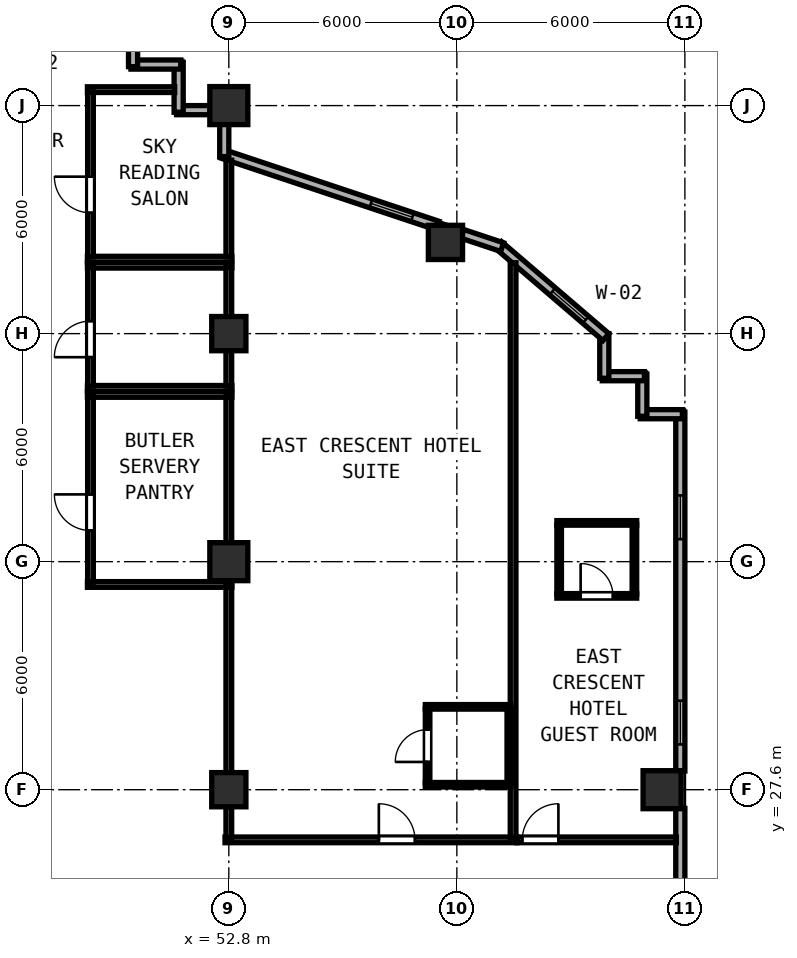
"""IFC4 building model, lengths in metres.
Left out: names, types, materials, properties, quantities, classifications, styles, units other than length and angle.
Written with IfcOpenShell. Run it as: python <this file> out.ifc"""

import sys

from ifc_helpers import new_model, si_unit, direction, frame, frame_2d, origin, origin_2d, place, context, subcontext, project, spatial, rectangle, hollow_rectangle, extrude, element, fill, save


model = new_model("IFC4")
c1 = context("Model", 3, precision=1e-05, world=origin(), true_north=direction((0.0, 1.0)))
c2 = subcontext(c1, "Body", "Model", "MODEL_VIEW")
j1 = project(units=[si_unit("LENGTHUNIT", "METRE"), si_unit("PLANEANGLEUNIT", "RADIAN")], contexts=[c1])
p1 = place(None, origin())
s1 = spatial("IfcSite", under=j1, at=p1, CompositionType="ELEMENT")
p2 = place(p1, origin())
s2 = spatial("IfcBuilding", under=s1, at=p2, CompositionType="ELEMENT")
p3 = place(p2, frame((0.0, 0.0, 113.6)))
s3 = spatial("IfcBuildingStorey", under=s2, at=p3, CompositionType="ELEMENT", Elevation=113.6)
for number, where, z_axis, x_axis in (
    (1, (52.8, 33.6, 0.0), (0.0, 0.0, 1.0), (1.0, 0.0, 0.0)),
    (2, (52.8, 45.6, 0.0), (0.0, 0.0, 1.0), (1.0, 0.0, 0.0)),
    (3, (64.2, 27.6, 0.0), (0.0, 0.0, 1.0), (1.0, 0.0, 0.0)),
):
    element("IfcColumn", number, at=place(p3, frame(where, z_axis=z_axis, x_axis=x_axis)), inside=s3, PredefinedType="COLUMN", context=c2, shape_type="SweptSolid", body=[
        extrude(hollow_rectangle(XDim=1.0, YDim=1.0, WallThickness=0.038, at=origin_2d()), origin(), (0.0, 0.0, 1.0), 3.8),
    ])
for number, where, z_axis, x_axis in (
    (4, (52.8, 27.6, 0.0), (0.0, 0.0, 1.0), (1.0, 0.0, 0.0)),
    (5, (52.8, 39.6, 0.0), (0.0, 0.0, 1.0), (1.0, 0.0, 0.0)),
    (6, (58.5, 42.0, 0.0), (0.0, 0.0, 1.0), (1.0, 0.0, 0.0)),
):
    element("IfcColumn", number, at=place(p3, frame(where, z_axis=z_axis, x_axis=x_axis)), inside=s3, PredefinedType="COLUMN", context=c2, shape_type="SweptSolid", body=[
        extrude(hollow_rectangle(XDim=0.9, YDim=0.9, WallThickness=0.034, at=origin_2d()), origin(), (0.0, 0.0, 1.0), 3.8),
    ])
p4 = place(p3, frame((64.68, 17.292, 0.0), z_axis=(0.0, 0.0, 1.0), x_axis=(0.0, 1.0, 0.0)))
e7 = element("IfcWall", 7, at=p4, inside=s3, PredefinedType="SOLIDWALL", context=c2, shape_type="SweptSolid", body=[
    extrude(rectangle(XDim=9.816, YDim=0.24, at=frame_2d((4.908, 0.0))), origin(), (0.0, 0.0, 1.0), 3.6),
])
p5 = place(p4, frame((0.7, 0.0, 0.85)))
e8 = element("IfcOpeningElement", 8, at=p5, cuts=e7, PredefinedType="OPENING", context=c2, shape_type="SweptSolid", body=[
    extrude(rectangle(XDim=1.15, YDim=1.8, at=frame_2d((0.575, 0.9))), frame((0.0, 0.13, 0.0), z_axis=(0.0, -1.0, 0.0), x_axis=(1.0, 0.0, 0.0)), (0.0, 0.0, 1.0), 0.26),
])
p6 = place(p4, frame((5.593, 0.0, 0.85)))
e9 = element("IfcOpeningElement", 9, at=p6, cuts=e7, PredefinedType="OPENING", context=c2, shape_type="SweptSolid", body=[
    extrude(rectangle(XDim=1.15, YDim=1.8, at=frame_2d((0.575, 0.9))), frame((0.0, 0.13, 0.0), z_axis=(0.0, -1.0, 0.0), x_axis=(1.0, 0.0, 0.0)), (0.0, 0.0, 1.0), 0.26),
])
p7 = place(p3, frame((64.68, 28.092, 0.0), z_axis=(0.0, 0.0, 1.0), x_axis=(0.0, 1.0, 0.0)))
e10 = element("IfcWall", 10, at=p7, inside=s3, PredefinedType="SOLIDWALL", context=c2, shape_type="SweptSolid", body=[
    extrude(rectangle(XDim=9.443, YDim=0.24, at=frame_2d((4.721, 0.0))), origin(), (0.0, 0.0, 1.0), 3.6),
])
p8 = place(p7, frame((0.7, 0.0, 0.85)))
e11 = element("IfcOpeningElement", 11, at=p8, cuts=e10, PredefinedType="OPENING", context=c2, shape_type="SweptSolid", body=[
    extrude(rectangle(XDim=1.15, YDim=1.8, at=frame_2d((0.575, 0.9))), frame((0.0, 0.13, 0.0), z_axis=(0.0, -1.0, 0.0), x_axis=(1.0, 0.0, 0.0)), (0.0, 0.0, 1.0), 0.26),
])
p9 = place(p7, frame((6.1, 0.0, 0.85)))
e12 = element("IfcOpeningElement", 12, at=p9, cuts=e10, PredefinedType="OPENING", context=c2, shape_type="SweptSolid", body=[
    extrude(rectangle(XDim=1.15, YDim=1.8, at=frame_2d((0.575, 0.9))), frame((0.0, 0.13, 0.0), z_axis=(0.0, -1.0, 0.0), x_axis=(1.0, 0.0, 0.0)), (0.0, 0.0, 1.0), 0.26),
])
p10 = place(p3, frame((64.735, 37.48, 0.0), z_axis=(0.0, 0.0, 1.0), x_axis=(-1.0, 0.0, 0.0)))
e13 = element("IfcWall", 13, at=p10, inside=s3, PredefinedType="SOLIDWALL", context=c2, shape_type="SweptSolid", body=[
    extrude(rectangle(XDim=1.11, YDim=0.24, at=frame_2d((0.555, 0.0))), origin(), (0.0, 0.0, 1.0), 3.6),
])
p11 = place(p3, frame((63.68, 37.425, 0.0), z_axis=(0.0, 0.0, 1.0), x_axis=(0.0, 1.0, 0.0)))
e14 = element("IfcWall", 14, at=p11, inside=s3, PredefinedType="SOLIDWALL", context=c2, shape_type="SweptSolid", body=[
    extrude(rectangle(XDim=1.11, YDim=0.24, at=frame_2d((0.555, 0.0))), origin(), (0.0, 0.0, 1.0), 3.6),
])
p12 = place(p3, frame((63.735, 38.48, 0.0), z_axis=(0.0, 0.0, 1.0), x_axis=(-1.0, 0.0, 0.0)))
e15 = element("IfcWall", 15, at=p12, inside=s3, PredefinedType="SOLIDWALL", context=c2, shape_type="SweptSolid", body=[
    extrude(rectangle(XDim=1.11, YDim=0.24, at=frame_2d((0.555, 0.0))), origin(), (0.0, 0.0, 1.0), 3.6),
])
p13 = place(p3, frame((62.68, 38.425, 0.0), z_axis=(0.0, 0.0, 1.0), x_axis=(0.0, 1.0, 0.0)))
e16 = element("IfcWall", 16, at=p13, inside=s3, PredefinedType="SOLIDWALL", context=c2, shape_type="SweptSolid", body=[
    extrude(rectangle(XDim=1.175, YDim=0.24, at=frame_2d((0.587, 0.0))), origin(), (0.0, 0.0, 1.0), 3.6),
])
p14 = place(p3, frame((62.722, 39.509, 0.0), z_axis=(0.0, 0.0, 1.0), x_axis=(-0.759247334792, 0.650802185469, 0.0)))
e17 = element("IfcWall", 17, at=p14, inside=s3, PredefinedType="SOLIDWALL", context=c2, shape_type="SweptSolid", body=[
    extrude(rectangle(XDim=3.719, YDim=0.24, at=frame_2d((1.86, 0.0))), origin(), (0.0, 0.0, 1.0), 3.6),
])
p15 = place(p14, frame((0.7, 0.0, 0.85)))
e18 = element("IfcOpeningElement", 18, at=p15, cuts=e17, PredefinedType="OPENING", context=c2, shape_type="SweptSolid", body=[
    extrude(rectangle(XDim=1.15, YDim=1.8, at=frame_2d((0.575, 0.9))), frame((0.0, 0.13, 0.0), z_axis=(0.0, -1.0, 0.0), x_axis=(1.0, 0.0, 0.0)), (0.0, 0.0, 1.0), 0.26),
])
p16 = place(p3, frame((59.992, 41.876, 0.0), z_axis=(0.0, 0.0, 1.0), x_axis=(-0.948661238983, 0.316293935527, 0.0)))
e19 = element("IfcWall", 19, at=p16, inside=s3, PredefinedType="SOLIDWALL", context=c2, shape_type="SweptSolid", body=[
    extrude(rectangle(XDim=1.107, YDim=0.24, at=frame_2d((0.553, 0.0))), origin(), (0.0, 0.0, 1.0), 3.6),
])
p17 = place(p3, frame((58.295, 42.442, 0.0), z_axis=(0.0, 0.0, 1.0), x_axis=(-0.948687385027, 0.316215504823, 0.0)))
e20 = element("IfcWall", 20, at=p17, inside=s3, PredefinedType="SOLIDWALL", context=c2, shape_type="SweptSolid", body=[
    extrude(rectangle(XDim=5.973, YDim=0.24, at=frame_2d((2.987, 0.0))), origin(), (0.0, 0.0, 1.0), 3.145),
])
p18 = place(p17, frame((0.7, 0.0, 0.85)))
e21 = element("IfcOpeningElement", 21, at=p18, cuts=e20, PredefinedType="OPENING", context=c2, shape_type="SweptSolid", body=[
    extrude(rectangle(XDim=1.15, YDim=1.8, at=frame_2d((0.575, 0.9))), frame((0.0, 0.13, 0.0), z_axis=(0.0, -1.0, 0.0), x_axis=(1.0, 0.0, 0.0)), (0.0, 0.0, 1.0), 0.26),
])
p19 = place(p3, frame((52.68, 44.259, 0.0), z_axis=(0.0, 0.0, 1.0), x_axis=(0.0, 1.0, 0.0)))
e22 = element("IfcWall", 22, at=p19, inside=s3, PredefinedType="SOLIDWALL", context=c2, shape_type="SweptSolid", body=[
    extrude(rectangle(XDim=0.849, YDim=0.24, at=frame_2d((0.425, 0.0))), origin(), (0.0, 0.0, 1.0), 3.145),
])
p20 = place(p3, frame((52.308, 45.48, 0.0), z_axis=(0.0, 0.0, 1.0), x_axis=(-1.0, 0.0, 0.0)))
e23 = element("IfcWall", 23, at=p20, inside=s3, PredefinedType="SOLIDWALL", context=c2, shape_type="SweptSolid", body=[
    extrude(rectangle(XDim=0.883, YDim=0.24, at=frame_2d((0.441, 0.0))), origin(), (0.0, 0.0, 1.0), 3.6),
])
p21 = place(p3, frame((51.48, 45.425, 0.0), z_axis=(0.0, 0.0, 1.0), x_axis=(0.0, 1.0, 0.0)))
e24 = element("IfcWall", 24, at=p21, inside=s3, PredefinedType="SOLIDWALL", context=c2, shape_type="SweptSolid", body=[
    extrude(rectangle(XDim=1.31, YDim=0.24, at=frame_2d((0.655, 0.0))), origin(), (0.0, 0.0, 1.0), 3.6),
])
p22 = place(p3, frame((51.535, 46.68, 0.0), z_axis=(0.0, 0.0, 1.0), x_axis=(-1.0, 0.0, 0.0)))
e25 = element("IfcWall", 25, at=p22, inside=s3, PredefinedType="SOLIDWALL", context=c2, shape_type="SweptSolid", body=[
    extrude(rectangle(XDim=1.31, YDim=0.24, at=frame_2d((0.655, 0.0))), origin(), (0.0, 0.0, 1.0), 3.6),
])
p23 = place(p3, frame((50.28, 46.625, 0.0), z_axis=(0.0, 0.0, 1.0), x_axis=(0.0, 1.0, 0.0)))
e26 = element("IfcWall", 26, at=p23, inside=s3, PredefinedType="SOLIDWALL", context=c2, shape_type="SweptSolid", body=[
    extrude(rectangle(XDim=1.54, YDim=0.24, at=frame_2d((0.77, 0.0))), origin(), (0.0, 0.0, 1.0), 3.6),
])
for number, where, z_axis, x_axis in (
    (27, (49.08, 38.0, 0.0), (0.0, 0.0, 1.0), (1.0, 0.0, 0.0)),
    (28, (49.08, 33.0, 0.0), (0.0, 0.0, 1.0), (1.0, 0.0, 0.0)),
):
    element("IfcWall", number, at=place(p3, frame(where, z_axis=z_axis, x_axis=x_axis)), inside=s3, PredefinedType="PARTITIONING", context=c2, shape_type="SweptSolid", body=[
        extrude(rectangle(XDim=3.8, YDim=0.15, at=frame_2d((1.9, 0.0))), origin(), (0.0, 0.0, 1.0), 3.6),
    ])
p24 = place(p3, frame((49.16, 33.06, 0.0), z_axis=(0.0, 0.0, 1.0), x_axis=(0.0, 1.0, 0.0)))
e29 = element("IfcWall", 29, at=p24, inside=s3, PredefinedType="PARTITIONING", context=c2, shape_type="SweptSolid", body=[
    extrude(rectangle(XDim=4.88, YDim=0.15, at=frame_2d((2.44, 0.0))), origin(), (0.0, 0.0, 1.0), 3.6),
])
p25 = place(p24, frame((1.36, 0.0, 0.0)))
e30 = element("IfcOpeningElement", 30, at=p25, cuts=e29, PredefinedType="OPENING", context=c2, shape_type="SweptSolid", body=[
    extrude(rectangle(XDim=0.95, YDim=2.12, at=frame_2d((0.475, 1.06))), frame((0.0, 0.085, 0.0), z_axis=(0.0, -1.0, 0.0), x_axis=(1.0, 0.0, 0.0)), (0.0, 0.0, 1.0), 0.17),
])
p26 = place(p3, frame((52.8, 33.06, 0.0), z_axis=(0.0, 0.0, 1.0), x_axis=(0.0, 1.0, 0.0)))
e31 = element("IfcWall", 31, at=p26, inside=s3, PredefinedType="PARTITIONING", context=c2, shape_type="SweptSolid", body=[
    extrude(rectangle(XDim=4.88, YDim=0.15, at=frame_2d((2.44, 0.0))), origin(), (0.0, 0.0, 1.0), 3.145),
])
for number, where, z_axis, x_axis in (
    (32, (49.08, 41.4, 0.0), (0.0, 0.0, 1.0), (1.0, 0.0, 0.0)),
    (33, (49.08, 38.16, 0.0), (0.0, 0.0, 1.0), (1.0, 0.0, 0.0)),
):
    element("IfcWall", number, at=place(p3, frame(where, z_axis=z_axis, x_axis=x_axis)), inside=s3, PredefinedType="PARTITIONING", context=c2, shape_type="SweptSolid", body=[
        extrude(rectangle(XDim=3.8, YDim=0.15, at=frame_2d((1.9, 0.0))), origin(), (0.0, 0.0, 1.0), 3.6),
    ])
p27 = place(p3, frame((49.16, 38.22, 0.0), z_axis=(0.0, 0.0, 1.0), x_axis=(0.0, 1.0, 0.0)))
e34 = element("IfcWall", 34, at=p27, inside=s3, PredefinedType="PARTITIONING", context=c2, shape_type="SweptSolid", body=[
    extrude(rectangle(XDim=3.12, YDim=0.15, at=frame_2d((1.56, 0.0))), origin(), (0.0, 0.0, 1.0), 3.6),
])
p28 = place(p27, frame((0.76, 0.0, 0.0)))
e35 = element("IfcOpeningElement", 35, at=p28, cuts=e34, PredefinedType="OPENING", context=c2, shape_type="SweptSolid", body=[
    extrude(rectangle(XDim=0.95, YDim=2.12, at=frame_2d((0.475, 1.06))), frame((0.0, 0.085, 0.0), z_axis=(0.0, -1.0, 0.0), x_axis=(1.0, 0.0, 0.0)), (0.0, 0.0, 1.0), 0.17),
])
p29 = place(p3, frame((52.8, 38.22, 0.0), z_axis=(0.0, 0.0, 1.0), x_axis=(0.0, 1.0, 0.0)))
e36 = element("IfcWall", 36, at=p29, inside=s3, PredefinedType="PARTITIONING", context=c2, shape_type="SweptSolid", body=[
    extrude(rectangle(XDim=3.12, YDim=0.15, at=frame_2d((1.56, 0.0))), origin(), (0.0, 0.0, 1.0), 3.145),
])
p30 = place(p3, frame((49.08, 46.02, 0.0), z_axis=(0.0, 0.0, 1.0), x_axis=(1.0, 0.0, 0.0)))
e37 = element("IfcWall", 37, at=p30, inside=s3, PredefinedType="PARTITIONING", context=c2, shape_type="SweptSolid", body=[
    extrude(rectangle(XDim=2.295, YDim=0.15, at=frame_2d((1.147, 0.0))), origin(), (0.0, 0.0, 1.0), 3.6),
])
p31 = place(p3, frame((49.08, 41.56, 0.0), z_axis=(0.0, 0.0, 1.0), x_axis=(1.0, 0.0, 0.0)))
e38 = element("IfcWall", 38, at=p31, inside=s3, PredefinedType="PARTITIONING", context=c2, shape_type="SweptSolid", body=[
    extrude(rectangle(XDim=3.8, YDim=0.15, at=frame_2d((1.9, 0.0))), origin(), (0.0, 0.0, 1.0), 3.6),
])
p32 = place(p3, frame((49.16, 41.62, 0.0), z_axis=(0.0, 0.0, 1.0), x_axis=(0.0, 1.0, 0.0)))
e39 = element("IfcWall", 39, at=p32, inside=s3, PredefinedType="PARTITIONING", context=c2, shape_type="SweptSolid", body=[
    extrude(rectangle(XDim=4.34, YDim=0.15, at=frame_2d((2.17, 0.0))), origin(), (0.0, 0.0, 1.0), 3.6),
])
p33 = place(p32, frame((1.16, 0.0, 0.0)))
e40 = element("IfcOpeningElement", 40, at=p33, cuts=e39, PredefinedType="OPENING", context=c2, shape_type="SweptSolid", body=[
    extrude(rectangle(XDim=0.95, YDim=2.12, at=frame_2d((0.475, 1.06))), frame((0.0, 0.085, 0.0), z_axis=(0.0, -1.0, 0.0), x_axis=(1.0, 0.0, 0.0)), (0.0, 0.0, 1.0), 0.17),
])
p34 = place(p3, frame((52.8, 41.62, 0.0), z_axis=(0.0, 0.0, 1.0), x_axis=(0.0, 1.0, 0.0)))
e41 = element("IfcWall", 41, at=p34, inside=s3, PredefinedType="PARTITIONING", context=c2, shape_type="SweptSolid", body=[
    extrude(rectangle(XDim=2.543, YDim=0.15, at=frame_2d((1.271, 0.0))), origin(), (0.0, 0.0, 1.0), 3.145),
])
p35 = place(p3, frame((52.7, 26.28, 0.0), z_axis=(0.0, 0.0, 1.0), x_axis=(1.0, 0.0, 0.0)))
e42 = element("IfcWall", 42, at=p35, inside=s3, PredefinedType="PARTITIONING", context=c2, shape_type="SweptSolid", body=[
    extrude(rectangle(XDim=7.68, YDim=0.15, at=frame_2d((3.84, 0.0))), origin(), (0.0, 0.0, 1.0), 3.6),
])
p36 = place(p35, frame((4.048, 0.0, 0.0)))
e43 = element("IfcOpeningElement", 43, at=p36, cuts=e42, PredefinedType="OPENING", context=c2, shape_type="SweptSolid", body=[
    extrude(rectangle(XDim=0.95, YDim=2.18, at=frame_2d((0.475, 1.09))), frame((0.0, 0.085, 0.0), z_axis=(0.0, -1.0, 0.0), x_axis=(1.0, 0.0, 0.0)), (0.0, 0.0, 1.0), 0.17),
])
p37 = place(p3, frame((52.8, 26.34, 0.0), z_axis=(0.0, 0.0, 1.0), x_axis=(0.0, 1.0, 0.0)))
e44 = element("IfcWall", 44, at=p37, inside=s3, PredefinedType="PARTITIONING", context=c2, shape_type="SweptSolid", body=[
    extrude(rectangle(XDim=6.6, YDim=0.15, at=frame_2d((3.3, 0.0))), origin(), (0.0, 0.0, 1.0), 3.145),
])
p38 = place(p3, frame((60.28, 26.34, 0.0), z_axis=(0.0, 0.0, 1.0), x_axis=(0.0, 1.0, 0.0)))
e45 = element("IfcWall", 45, at=p38, inside=s3, PredefinedType="PARTITIONING", context=c2, shape_type="SweptSolid", body=[
    extrude(rectangle(XDim=15.124, YDim=0.15, at=frame_2d((7.562, 0.0))), origin(), (0.0, 0.0, 1.0), 3.6),
])
p39 = place(p3, frame((57.97, 29.78, 0.0), z_axis=(0.0, 0.0, 1.0), x_axis=(1.0, 0.0, 0.0)))
e46 = element("IfcWall", 46, at=p39, inside=s3, PredefinedType="PARTITIONING", context=c2, shape_type="SweptSolid", body=[
    extrude(rectangle(XDim=2.25, YDim=0.12, at=frame_2d((1.125, 0.0))), origin(), (0.0, 0.0, 1.0), 3.6),
])
p40 = place(p3, frame((57.97, 27.73, 0.0), z_axis=(0.0, 0.0, 1.0), x_axis=(1.0, 0.0, 0.0)))
e47 = element("IfcWall", 47, at=p40, inside=s3, PredefinedType="PARTITIONING", context=c2, shape_type="SweptSolid", body=[
    extrude(rectangle(XDim=2.25, YDim=0.12, at=frame_2d((1.125, 0.0))), origin(), (0.0, 0.0, 1.0), 3.145),
])
p41 = place(p3, frame((58.03, 27.775, 0.0), z_axis=(0.0, 0.0, 1.0), x_axis=(0.0, 1.0, 0.0)))
e48 = element("IfcWall", 48, at=p41, inside=s3, PredefinedType="PARTITIONING", context=c2, shape_type="SweptSolid", body=[
    extrude(rectangle(XDim=1.96, YDim=0.12, at=frame_2d((0.98, 0.0))), origin(), (0.0, 0.0, 1.0), 3.6),
])
p42 = place(p41, frame((1.405, 0.0, 0.0), z_axis=(0.0, 0.0, 1.0), x_axis=(-1.0, 0.0, 0.0)))
e49 = element("IfcOpeningElement", 49, at=p42, cuts=e48, PredefinedType="OPENING", context=c2, shape_type="SweptSolid", body=[
    extrude(rectangle(XDim=0.85, YDim=2.1, at=frame_2d((0.425, 1.05))), frame((0.0, 0.07, 0.0), z_axis=(0.0, -1.0, 0.0), x_axis=(1.0, 0.0, 0.0)), (0.0, 0.0, 1.0), 0.14),
])
p43 = place(p3, frame((60.18, 27.775, 0.0), z_axis=(0.0, 0.0, 1.0), x_axis=(0.0, 1.0, 0.0)))
e50 = element("IfcWall", 50, at=p43, inside=s3, PredefinedType="PARTITIONING", context=c2, shape_type="SweptSolid", body=[
    extrude(rectangle(XDim=1.96, YDim=0.12, at=frame_2d((0.98, 0.0))), origin(), (0.0, 0.0, 1.0), 3.6),
])
p44 = place(p3, frame((60.382, 26.28, 0.0), z_axis=(0.0, 0.0, 1.0), x_axis=(1.0, 0.0, 0.0)))
e51 = element("IfcWall", 51, at=p44, inside=s3, PredefinedType="PARTITIONING", context=c2, shape_type="SweptSolid", body=[
    extrude(rectangle(XDim=4.193, YDim=0.15, at=frame_2d((2.096, 0.0))), origin(), (0.0, 0.0, 1.0), 3.6),
])
p45 = place(p44, frame((0.14, 0.0, 0.0)))
e52 = element("IfcOpeningElement", 52, at=p45, cuts=e51, PredefinedType="OPENING", context=c2, shape_type="SweptSolid", body=[
    extrude(rectangle(XDim=0.95, YDim=2.15, at=frame_2d((0.475, 1.075))), frame((0.0, 0.085, 0.0), z_axis=(0.0, -1.0, 0.0), x_axis=(1.0, 0.0, 0.0)), (0.0, 0.0, 1.0), 0.17),
])
p46 = place(p3, frame((61.432, 34.62, 0.0), z_axis=(0.0, 0.0, 1.0), x_axis=(1.0, 0.0, 0.0)))
e53 = element("IfcWall", 53, at=p46, inside=s3, PredefinedType="PARTITIONING", context=c2, shape_type="SweptSolid", body=[
    extrude(rectangle(XDim=2.1, YDim=0.12, at=frame_2d((1.05, 0.0))), origin(), (0.0, 0.0, 1.0), 3.6),
])
p47 = place(p3, frame((61.432, 32.7, 0.0), z_axis=(0.0, 0.0, 1.0), x_axis=(1.0, 0.0, 0.0)))
e54 = element("IfcWall", 54, at=p47, inside=s3, PredefinedType="PARTITIONING", context=c2, shape_type="SweptSolid", body=[
    extrude(rectangle(XDim=2.1, YDim=0.12, at=frame_2d((1.05, 0.0))), origin(), (0.0, 0.0, 1.0), 3.6),
])
p48 = place(p47, frame((0.625, 0.0, 0.0)))
e55 = element("IfcOpeningElement", 55, at=p48, cuts=e54, PredefinedType="OPENING", context=c2, shape_type="SweptSolid", body=[
    extrude(rectangle(XDim=0.85, YDim=2.1, at=frame_2d((0.425, 1.05))), frame((0.0, 0.07, 0.0), z_axis=(0.0, -1.0, 0.0), x_axis=(1.0, 0.0, 0.0)), (0.0, 0.0, 1.0), 0.14),
])
for number, where, z_axis, x_axis in (
    (56, (61.492, 32.745, 0.0), (0.0, 0.0, 1.0), (0.0, 1.0, 0.0)),
    (57, (63.472, 32.745, 0.0), (0.0, 0.0, 1.0), (0.0, 1.0, 0.0)),
):
    element("IfcWall", number, at=place(p3, frame(where, z_axis=z_axis, x_axis=x_axis)), inside=s3, PredefinedType="PARTITIONING", context=c2, shape_type="SweptSolid", body=[
        extrude(rectangle(XDim=1.83, YDim=0.12, at=frame_2d((0.915, 0.0))), origin(), (0.0, 0.0, 1.0), 3.6),
    ])
p49 = place(p8, origin())
e58 = element("IfcWindow", 58, at=p49, inside=s3, PartitioningType="SINGLE_PANEL", PredefinedType="WINDOW", context=c2, shape_type="SweptSolid", body=[
    extrude(rectangle(XDim=1.15, YDim=1.8, at=frame_2d((0.575, 0.9))), frame((0.0, 0.03, 0.0), z_axis=(0.0, -1.0, 0.0), x_axis=(1.0, 0.0, 0.0)), (0.0, 0.0, 1.0), 0.06),
])
fill(e11, e58)
p50 = place(p9, origin())
e59 = element("IfcWindow", 59, at=p50, inside=s3, PartitioningType="SINGLE_PANEL", PredefinedType="WINDOW", context=c2, shape_type="SweptSolid", body=[
    extrude(rectangle(XDim=1.15, YDim=1.8, at=frame_2d((0.575, 0.9))), frame((0.0, 0.03, 0.0), z_axis=(0.0, -1.0, 0.0), x_axis=(1.0, 0.0, 0.0)), (0.0, 0.0, 1.0), 0.06),
])
fill(e12, e59)
p51 = place(p15, origin())
e60 = element("IfcWindow", 60, at=p51, inside=s3, PartitioningType="SINGLE_PANEL", PredefinedType="WINDOW", context=c2, shape_type="SweptSolid", body=[
    extrude(rectangle(XDim=1.15, YDim=1.8, at=frame_2d((0.575, 0.9))), frame((0.0, 0.03, 0.0), z_axis=(0.0, -1.0, 0.0), x_axis=(1.0, 0.0, 0.0)), (0.0, 0.0, 1.0), 0.06),
])
fill(e18, e60)
p52 = place(p18, origin())
e61 = element("IfcWindow", 61, at=p52, inside=s3, PartitioningType="SINGLE_PANEL", PredefinedType="WINDOW", context=c2, shape_type="SweptSolid", body=[
    extrude(rectangle(XDim=1.15, YDim=1.8, at=frame_2d((0.575, 0.9))), frame((0.0, 0.03, 0.0), z_axis=(0.0, -1.0, 0.0), x_axis=(1.0, 0.0, 0.0)), (0.0, 0.0, 1.0), 0.06),
])
fill(e21, e61)
p53 = place(p25, origin())
e62 = element("IfcDoor", 62, at=p53, inside=s3, OperationType="SINGLE_SWING_RIGHT", PredefinedType="DOOR", context=c2, shape_type="SweptSolid", body=[
    extrude(rectangle(XDim=0.95, YDim=2.12, at=frame_2d((0.475, 1.06))), frame((0.0, 0.025, 0.0), z_axis=(0.0, -1.0, 0.0), x_axis=(1.0, 0.0, 0.0)), (0.0, 0.0, 1.0), 0.05),
])
fill(e30, e62)
p54 = place(p28, origin())
e63 = element("IfcDoor", 63, at=p54, inside=s3, OperationType="SINGLE_SWING_LEFT", PredefinedType="DOOR", context=c2, shape_type="SweptSolid", body=[
    extrude(rectangle(XDim=0.95, YDim=2.12, at=frame_2d((0.475, 1.06))), frame((0.0, 0.025, 0.0), z_axis=(0.0, -1.0, 0.0), x_axis=(1.0, 0.0, 0.0)), (0.0, 0.0, 1.0), 0.05),
])
fill(e35, e63)
p55 = place(p33, origin())
e64 = element("IfcDoor", 64, at=p55, inside=s3, OperationType="SINGLE_SWING_RIGHT", PredefinedType="DOOR", context=c2, shape_type="SweptSolid", body=[
    extrude(rectangle(XDim=0.95, YDim=2.12, at=frame_2d((0.475, 1.06))), frame((0.0, 0.025, 0.0), z_axis=(0.0, -1.0, 0.0), x_axis=(1.0, 0.0, 0.0)), (0.0, 0.0, 1.0), 0.05),
])
fill(e40, e64)
p56 = place(p36, origin())
e65 = element("IfcDoor", 65, at=p56, inside=s3, OperationType="SINGLE_SWING_LEFT", PredefinedType="DOOR", context=c2, shape_type="SweptSolid", body=[
    extrude(rectangle(XDim=0.95, YDim=2.18, at=frame_2d((0.475, 1.09))), frame((0.0, 0.025, 0.0), z_axis=(0.0, -1.0, 0.0), x_axis=(1.0, 0.0, 0.0)), (0.0, 0.0, 1.0), 0.05),
])
fill(e43, e65)
p57 = place(p42, origin())
e66 = element("IfcDoor", 66, at=p57, inside=s3, OperationType="SINGLE_SWING_RIGHT", PredefinedType="DOOR", context=c2, shape_type="SweptSolid", body=[
    extrude(rectangle(XDim=0.85, YDim=2.1, at=frame_2d((0.425, 1.05))), frame((0.0, 0.025, 0.0), z_axis=(0.0, -1.0, 0.0), x_axis=(1.0, 0.0, 0.0)), (0.0, 0.0, 1.0), 0.05),
])
fill(e49, e66)
p58 = place(p45, origin())
e67 = element("IfcDoor", 67, at=p58, inside=s3, OperationType="SINGLE_SWING_RIGHT", PredefinedType="DOOR", context=c2, shape_type="SweptSolid", body=[
    extrude(rectangle(XDim=0.95, YDim=2.15, at=frame_2d((0.475, 1.075))), frame((0.0, 0.025, 0.0), z_axis=(0.0, -1.0, 0.0), x_axis=(1.0, 0.0, 0.0)), (0.0, 0.0, 1.0), 0.05),
])
fill(e52, e67)
p59 = place(p48, origin())
e68 = element("IfcDoor", 68, at=p59, inside=s3, OperationType="SINGLE_SWING_LEFT", PredefinedType="DOOR", context=c2, shape_type="SweptSolid", body=[
    extrude(rectangle(XDim=0.85, YDim=2.1, at=frame_2d((0.425, 1.05))), frame((0.0, 0.025, 0.0), z_axis=(0.0, -1.0, 0.0), x_axis=(1.0, 0.0, 0.0)), (0.0, 0.0, 1.0), 0.05),
])
fill(e55, e68)
save(model, sys.argv[1])
